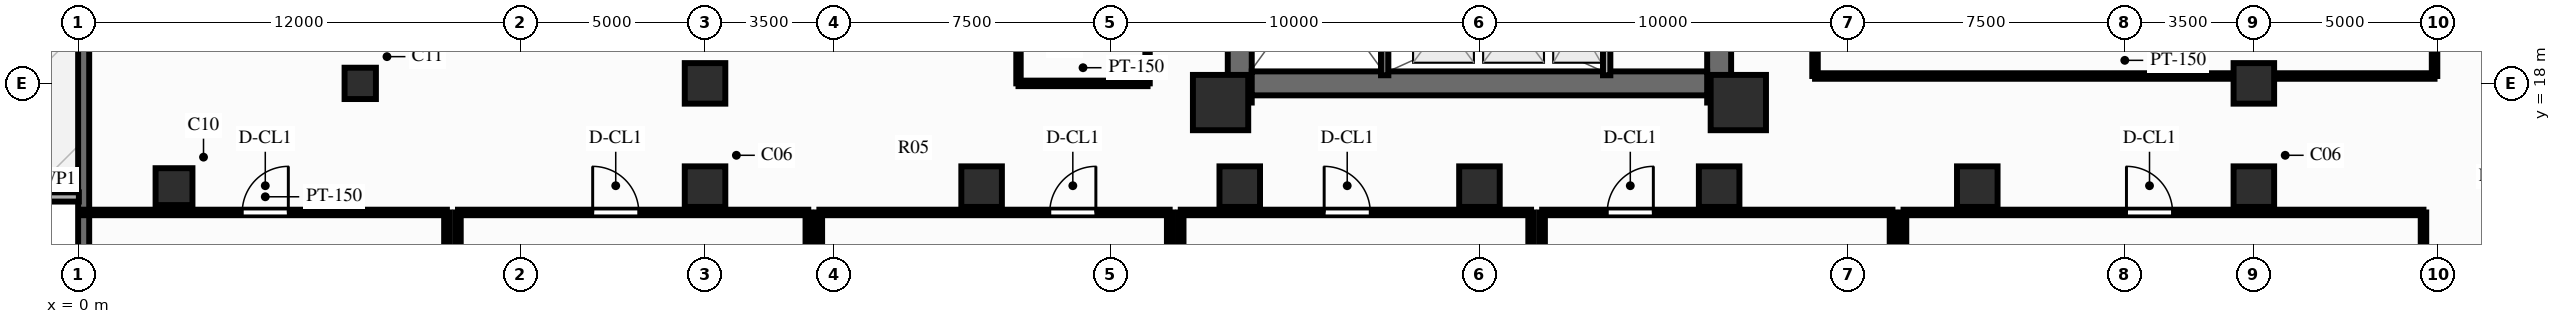
"""IFC4 building model, lengths in metres.
Left out: names, types, materials, properties, quantities, classifications, styles, units other than length and angle.
Written with IfcOpenShell. Run it as: python <this file> out.ifc"""

import sys

from ifc_helpers import new_model, si_unit, direction, frame, frame_2d, origin, origin_2d, place, context, subcontext, project, spatial, rectangle, circle, extrude, source, transform, mapped, element, fill, save


model = new_model("IFC4")
c1 = context("Model", 3, precision=1e-05, world=origin(), true_north=direction((0.0, 1.0)))
c2 = subcontext(c1, "Body", "Model", "MODEL_VIEW")
j1 = project(units=[si_unit("LENGTHUNIT", "METRE"), si_unit("PLANEANGLEUNIT", "RADIAN")], contexts=[c1])
p1 = place(None, origin())
s1 = spatial("IfcSite", under=j1, at=p1, CompositionType="ELEMENT")
p2 = place(p1, origin())
s2 = spatial("IfcBuilding", under=s1, at=p2, CompositionType="ELEMENT")
p3 = place(p2, frame((0.0, 0.0, 4.2)))
s3 = spatial("IfcBuildingStorey", under=s2, at=p3, CompositionType="ELEMENT", Elevation=4.2)
p4 = place(p3, frame((31.5, 17.48, 0.0), z_axis=(0.0, 0.0, 1.0), x_axis=(0.0, 1.0, 0.0)))
e1 = element("IfcWall", 1, at=p4, inside=s3, PredefinedType="SHEAR", context=c2, shape_type="SweptSolid", body=[
    extrude(rectangle(XDim=19.04, YDim=0.65, at=frame_2d((9.52, 0.0))), origin(), (0.0, 0.0, 1.0), 3.6),
])
p5 = place(p4, frame((6.32, 0.0, 0.0)))
e2 = element("IfcOpeningElement", 2, at=p5, cuts=e1, PredefinedType="OPENING", context=c2, shape_type="SweptSolid", body=[
    extrude(rectangle(XDim=1.1, YDim=2.15, at=frame_2d((0.55, 1.075))), frame((0.0, 0.337, 0.0), z_axis=(0.0, -1.0, 0.0), x_axis=(1.0, 0.0, 0.0)), (0.0, 0.0, 1.0), 0.674),
])
p6 = place(p3, frame((44.5, 17.48, 0.0), z_axis=(0.0, 0.0, 1.0), x_axis=(0.0, 1.0, 0.0)))
e3 = element("IfcWall", 3, at=p6, inside=s3, PredefinedType="SHEAR", context=c2, shape_type="SweptSolid", body=[
    extrude(rectangle(XDim=19.04, YDim=0.65, at=frame_2d((9.52, 0.0))), origin(), (0.0, 0.0, 1.0), 3.6),
])
p7 = place(p6, frame((12.67, 0.0, 0.0), z_axis=(0.0, 0.0, 1.0), x_axis=(-1.0, 0.0, 0.0)))
e4 = element("IfcOpeningElement", 4, at=p7, cuts=e3, PredefinedType="OPENING", context=c2, shape_type="SweptSolid", body=[
    extrude(rectangle(XDim=1.1, YDim=2.15, at=frame_2d((0.55, 1.075))), frame((0.0, 0.337, 0.0), z_axis=(0.0, -1.0, 0.0), x_axis=(1.0, 0.0, 0.0)), (0.0, 0.0, 1.0), 0.674),
])
p8 = place(p3, frame((31.825, 18.0, 0.0), z_axis=(0.0, 0.0, 1.0), x_axis=(1.0, 0.0, 0.0)))
e5 = element("IfcWall", 5, at=p8, inside=s3, PredefinedType="SHEAR", context=c2, shape_type="SweptSolid", body=[
    extrude(rectangle(XDim=12.35, YDim=0.65, at=frame_2d((6.175, 0.0))), origin(), (0.0, 0.0, 1.0), 3.6),
])
m1 = source(origin(), c2, "Body", "SweptSolid", [
    extrude(rectangle(XDim=1.5, YDim=1.5, at=origin_2d()), origin(), (0.0, 0.0, 1.0), 3.6),
])
for number, where, z_axis, x_axis in (
    (6, (30.98, 17.48, 0.0), (0.0, 0.0, 1.0), (1.0, 0.0, 0.0)),
    (7, (45.02, 17.48, 0.0), (0.0, 0.0, 1.0), (1.0, 0.0, 0.0)),
):
    element("IfcColumn", number, at=place(p3, frame(where, z_axis=z_axis, x_axis=x_axis)), inside=s3, PredefinedType="COLUMN", context=c2, shape_type="MappedRepresentation", body=[
        mapped(m1, transform((0.0, 0.0, 0.0), scale=1.0)),
    ])
m2 = source(origin(), c2, "Body", "SweptSolid", [
    extrude(circle(Radius=0.5, at=origin_2d()), origin(), (0.0, 0.0, 1.0), 3.6),
])
p9 = place(p3, frame((2.6, 15.2, 0.0), z_axis=(0.0, 0.0, 1.0), x_axis=(1.0, 0.0, 0.0)))
e8 = element("IfcColumn", 8, at=p9, inside=s3, PredefinedType="COLUMN", context=c2, shape_type="MappedRepresentation", body=[
    mapped(m2, transform((0.0, 0.0, 0.0), scale=1.0)),
])
m3 = source(origin(), c2, "Body", "SweptSolid", [
    extrude(circle(Radius=0.425, at=origin_2d()), origin(), (0.0, 0.0, 1.0), 3.6),
])
p10 = place(p3, frame((7.65, 18.0, 0.0), z_axis=(0.0, 0.0, 1.0), x_axis=(1.0, 0.0, 0.0)))
e9 = element("IfcColumn", 9, at=p10, inside=s3, PredefinedType="COLUMN", context=c2, shape_type="MappedRepresentation", body=[
    mapped(m3, transform((0.0, 0.0, 0.0), scale=1.0)),
])
m4 = source(origin(), c2, "Body", "SweptSolid", [
    extrude(rectangle(XDim=1.1, YDim=1.1, at=origin_2d()), origin(), (0.0, 0.0, 1.0), 3.6),
])
for number, where, z_axis, x_axis in (
    (10, (17.0, 15.2, 0.0), (0.0, 0.0, 1.0), (1.0, 0.0, 0.0)),
    (11, (59.0, 15.2, 0.0), (0.0, 0.0, 1.0), (1.0, 0.0, 0.0)),
    (12, (17.0, 18.0, 0.0), (0.0, 0.0, 1.0), (1.0, 0.0, 0.0)),
    (13, (59.0, 18.0, 0.0), (0.0, 0.0, 1.0), (1.0, 0.0, 0.0)),
    (14, (24.5, 15.2, 0.0), (0.0, 0.0, 1.0), (1.0, 0.0, 0.0)),
    (15, (31.5, 15.2, 0.0), (0.0, 0.0, 1.0), (1.0, 0.0, 0.0)),
    (16, (38.0, 15.2, 0.0), (0.0, 0.0, 1.0), (1.0, 0.0, 0.0)),
    (17, (44.5, 15.2, 0.0), (0.0, 0.0, 1.0), (1.0, 0.0, 0.0)),
    (18, (51.5, 15.2, 0.0), (0.0, 0.0, 1.0), (1.0, 0.0, 0.0)),
):
    element("IfcColumn", number, at=place(p3, frame(where, z_axis=z_axis, x_axis=x_axis)), inside=s3, PredefinedType="COLUMN", context=c2, shape_type="MappedRepresentation", body=[
        mapped(m4, transform((0.0, 0.0, 0.0), scale=1.0)),
    ])
p11 = place(p3, frame((0.15, 0.0, 0.0), z_axis=(0.0, 0.0, 1.0), x_axis=(0.0, 1.0, 0.0)))
e19 = element("IfcWall", 19, at=p11, inside=s3, PredefinedType="SOLIDWALL", context=c2, shape_type="SweptSolid", body=[
    extrude(rectangle(XDim=54.0, YDim=0.3, at=frame_2d((27.0, 0.0))), origin(), (0.0, 0.0, 1.0), 2.88),
])
p12 = place(p11, frame((6.405, 0.0, 0.85)))
e20 = element("IfcOpeningElement", 20, at=p12, cuts=e19, PredefinedType="OPENING", context=c2, shape_type="SweptSolid", body=[
    extrude(rectangle(XDim=1.8, YDim=1.65, at=frame_2d((0.9, 0.825))), frame((0.0, 0.162, 0.0), z_axis=(0.0, -1.0, 0.0), x_axis=(1.0, 0.0, 0.0)), (0.0, 0.0, 1.0), 0.324),
])
p13 = place(p11, frame((26.045, 0.0, 0.85)))
e21 = element("IfcOpeningElement", 21, at=p13, cuts=e19, PredefinedType="OPENING", context=c2, shape_type="SweptSolid", body=[
    extrude(rectangle(XDim=1.8, YDim=1.65, at=frame_2d((0.9, 0.825))), frame((0.0, 0.162, 0.0), z_axis=(0.0, -1.0, 0.0), x_axis=(1.0, 0.0, 0.0)), (0.0, 0.0, 1.0), 0.324),
])
p14 = place(p3, frame((-3.5, 14.92, 0.0), z_axis=(0.0, 0.0, 1.0), x_axis=(1.0, 0.0, 0.0)))
e22 = element("IfcWall", 22, at=p14, inside=s3, PredefinedType="PARAPET", context=c2, shape_type="SweptSolid", body=[
    extrude(rectangle(XDim=3.52, YDim=0.25, at=frame_2d((1.76, 0.0))), origin(), (0.0, 0.0, 1.0), 0.75),
])
p15 = place(p3, frame((41.45, 18.22, 0.0), z_axis=(0.0, 0.0, 1.0), x_axis=(0.0, 1.0, 0.0)))
e23 = element("IfcWall", 23, at=p15, inside=s3, PredefinedType="PARTITIONING", context=c2, shape_type="SweptSolid", body=[
    extrude(rectangle(XDim=2.96, YDim=0.2, at=frame_2d((1.48, 0.0))), origin(), (0.0, 0.0, 1.0), 3.32),
])
p16 = place(p3, frame((35.43, 18.22, 0.0), z_axis=(0.0, 0.0, 1.0), x_axis=(0.0, 1.0, 0.0)))
e24 = element("IfcWall", 24, at=p16, inside=s3, PredefinedType="SOLIDWALL", context=c2, shape_type="SweptSolid", body=[
    extrude(rectangle(XDim=7.22, YDim=0.2, at=frame_2d((3.61, 0.0))), origin(), (0.0, 0.0, 1.0), 3.32),
])
p17 = place(p16, frame((6.68, 0.0, 0.0), z_axis=(0.0, 0.0, 1.0), x_axis=(-1.0, 0.0, 0.0)))
e25 = element("IfcOpeningElement", 25, at=p17, cuts=e24, PredefinedType="OPENING", context=c2, shape_type="SweptSolid", body=[
    extrude(rectangle(XDim=1.1, YDim=2.15, at=frame_2d((0.55, 1.075))), frame((0.0, 0.112, 0.0), z_axis=(0.0, -1.0, 0.0), x_axis=(1.0, 0.0, 0.0)), (0.0, 0.0, 1.0), 0.224),
])
p18 = place(p3, frame((25.5, 18.0, 0.0), z_axis=(0.0, 0.0, 1.0), x_axis=(0.0, 1.0, 0.0)))
e26 = element("IfcWall", 26, at=p18, inside=s3, PredefinedType="PARTITIONING", context=c2, shape_type="SweptSolid", body=[
    extrude(rectangle(XDim=18.0, YDim=0.12, at=frame_2d((9.0, 0.0))), origin(), (0.0, 0.0, 1.0), 3.32),
])
p19 = place(p3, frame((29.0, 18.0, 0.0), z_axis=(0.0, 0.0, 1.0), x_axis=(0.0, 1.0, 0.0)))
e27 = element("IfcWall", 27, at=p19, inside=s3, PredefinedType="PARTITIONING", context=c2, shape_type="SweptSolid", body=[
    extrude(rectangle(XDim=4.0, YDim=0.12, at=frame_2d((2.0, 0.0))), origin(), (0.0, 0.0, 1.0), 3.32),
])
p20 = place(p19, frame((1.55, 0.0, 0.0)))
e28 = element("IfcOpeningElement", 28, at=p20, cuts=e27, PredefinedType="OPENING", context=c2, shape_type="SweptSolid", body=[
    extrude(rectangle(XDim=0.9, YDim=2.1, at=frame_2d((0.45, 1.05))), frame((0.0, 0.072, 0.0), z_axis=(0.0, -1.0, 0.0), x_axis=(1.0, 0.0, 0.0)), (0.0, 0.0, 1.0), 0.144),
])
p21 = place(p3, frame((25.5, 18.0, 0.0), z_axis=(0.0, 0.0, 1.0), x_axis=(1.0, 0.0, 0.0)))
e29 = element("IfcWall", 29, at=p21, inside=s3, PredefinedType="PARTITIONING", context=c2, shape_type="SweptSolid", body=[
    extrude(rectangle(XDim=3.5, YDim=0.15, at=frame_2d((1.75, 0.0))), origin(), (0.0, 0.0, 1.0), 2.69),
])
p22 = place(p3, frame((0.15, 14.5, 0.0), z_axis=(0.0, 0.0, 1.0), x_axis=(1.0, 0.0, 0.0)))
e30 = element("IfcWall", 30, at=p22, inside=s3, PredefinedType="PARTITIONING", context=c2, shape_type="SweptSolid", body=[
    extrude(rectangle(XDim=9.85, YDim=0.15, at=frame_2d((4.925, 0.0))), origin(), (0.0, 0.0, 1.0), 3.32),
])
p23 = place(p22, frame((4.3, 0.0, 0.0)))
e31 = element("IfcOpeningElement", 31, at=p23, cuts=e30, PredefinedType="OPENING", context=c2, shape_type="SweptSolid", body=[
    extrude(rectangle(XDim=1.25, YDim=2.15, at=frame_2d((0.625, 1.075))), frame((0.0, 0.087, 0.0), z_axis=(0.0, -1.0, 0.0), x_axis=(1.0, 0.0, 0.0)), (0.0, 0.0, 1.0), 0.174),
])
p24 = place(p3, frame((10.0, 0.1, 0.0), z_axis=(0.0, 0.0, 1.0), x_axis=(0.0, 1.0, 0.0)))
e32 = element("IfcWall", 32, at=p24, inside=s3, PredefinedType="PARTITIONING", context=c2, shape_type="SweptSolid", body=[
    extrude(rectangle(XDim=14.4, YDim=0.15, at=frame_2d((7.2, 0.0))), origin(), (0.0, 0.0, 1.0), 3.32),
])
p25 = place(p3, frame((10.3, 14.5, 0.0), z_axis=(0.0, 0.0, 1.0), x_axis=(1.0, 0.0, 0.0)))
e33 = element("IfcWall", 33, at=p25, inside=s3, PredefinedType="PARTITIONING", context=c2, shape_type="SweptSolid", body=[
    extrude(rectangle(XDim=9.5, YDim=0.15, at=frame_2d((4.75, 0.0))), origin(), (0.0, 0.0, 1.0), 3.32),
])
p26 = place(p25, frame((3.653, 0.0, 0.0)))
e34 = element("IfcOpeningElement", 34, at=p26, cuts=e33, PredefinedType="OPENING", context=c2, shape_type="SweptSolid", body=[
    extrude(rectangle(XDim=1.25, YDim=2.15, at=frame_2d((0.625, 1.075))), frame((0.0, 0.087, 0.0), z_axis=(0.0, -1.0, 0.0), x_axis=(1.0, 0.0, 0.0)), (0.0, 0.0, 1.0), 0.174),
])
for number, where, z_axis, x_axis in (
    (35, (10.3, 0.1, 0.0), (0.0, 0.0, 1.0), (0.0, 1.0, 0.0)),
    (36, (19.8, 0.1, 0.0), (0.0, 0.0, 1.0), (0.0, 1.0, 0.0)),
):
    element("IfcWall", number, at=place(p3, frame(where, z_axis=z_axis, x_axis=x_axis)), inside=s3, PredefinedType="PARTITIONING", context=c2, shape_type="SweptSolid", body=[
        extrude(rectangle(XDim=14.4, YDim=0.15, at=frame_2d((7.2, 0.0))), origin(), (0.0, 0.0, 1.0), 3.32),
    ])
p27 = place(p3, frame((20.1, 14.5, 0.0), z_axis=(0.0, 0.0, 1.0), x_axis=(1.0, 0.0, 0.0)))
e37 = element("IfcWall", 37, at=p27, inside=s3, PredefinedType="PARTITIONING", context=c2, shape_type="SweptSolid", body=[
    extrude(rectangle(XDim=9.5, YDim=0.15, at=frame_2d((4.75, 0.0))), origin(), (0.0, 0.0, 1.0), 3.32),
])
p28 = place(p27, frame((6.248, 0.0, 0.0)))
e38 = element("IfcOpeningElement", 38, at=p28, cuts=e37, PredefinedType="OPENING", context=c2, shape_type="SweptSolid", body=[
    extrude(rectangle(XDim=1.25, YDim=2.15, at=frame_2d((0.625, 1.075))), frame((0.0, 0.087, 0.0), z_axis=(0.0, -1.0, 0.0), x_axis=(1.0, 0.0, 0.0)), (0.0, 0.0, 1.0), 0.174),
])
for number, where, z_axis, x_axis in (
    (39, (20.1, 0.1, 0.0), (0.0, 0.0, 1.0), (0.0, 1.0, 0.0)),
    (40, (29.6, 0.1, 0.0), (0.0, 0.0, 1.0), (0.0, 1.0, 0.0)),
):
    element("IfcWall", number, at=place(p3, frame(where, z_axis=z_axis, x_axis=x_axis)), inside=s3, PredefinedType="PARTITIONING", context=c2, shape_type="SweptSolid", body=[
        extrude(rectangle(XDim=14.4, YDim=0.15, at=frame_2d((7.2, 0.0))), origin(), (0.0, 0.0, 1.0), 3.32),
    ])
p29 = place(p3, frame((29.9, 14.5, 0.0), z_axis=(0.0, 0.0, 1.0), x_axis=(1.0, 0.0, 0.0)))
e41 = element("IfcWall", 41, at=p29, inside=s3, PredefinedType="PARTITIONING", context=c2, shape_type="SweptSolid", body=[
    extrude(rectangle(XDim=9.5, YDim=0.15, at=frame_2d((4.75, 0.0))), origin(), (0.0, 0.0, 1.0), 3.32),
])
p30 = place(p29, frame((3.889, 0.0, 0.0)))
e42 = element("IfcOpeningElement", 42, at=p30, cuts=e41, PredefinedType="OPENING", context=c2, shape_type="SweptSolid", body=[
    extrude(rectangle(XDim=1.25, YDim=2.15, at=frame_2d((0.625, 1.075))), frame((0.0, 0.087, 0.0), z_axis=(0.0, -1.0, 0.0), x_axis=(1.0, 0.0, 0.0)), (0.0, 0.0, 1.0), 0.174),
])
for number, where, z_axis, x_axis in (
    (43, (29.9, 0.1, 0.0), (0.0, 0.0, 1.0), (0.0, 1.0, 0.0)),
    (44, (39.4, 0.1, 0.0), (0.0, 0.0, 1.0), (0.0, 1.0, 0.0)),
):
    element("IfcWall", number, at=place(p3, frame(where, z_axis=z_axis, x_axis=x_axis)), inside=s3, PredefinedType="PARTITIONING", context=c2, shape_type="SweptSolid", body=[
        extrude(rectangle(XDim=14.4, YDim=0.15, at=frame_2d((7.2, 0.0))), origin(), (0.0, 0.0, 1.0), 3.32),
    ])
p31 = place(p3, frame((39.7, 14.5, 0.0), z_axis=(0.0, 0.0, 1.0), x_axis=(1.0, 0.0, 0.0)))
e45 = element("IfcWall", 45, at=p31, inside=s3, PredefinedType="PARTITIONING", context=c2, shape_type="SweptSolid", body=[
    extrude(rectangle(XDim=9.5, YDim=0.15, at=frame_2d((4.75, 0.0))), origin(), (0.0, 0.0, 1.0), 3.32),
])
p32 = place(p31, frame((1.766, 0.0, 0.0)))
e46 = element("IfcOpeningElement", 46, at=p32, cuts=e45, PredefinedType="OPENING", context=c2, shape_type="SweptSolid", body=[
    extrude(rectangle(XDim=1.25, YDim=2.15, at=frame_2d((0.625, 1.075))), frame((0.0, 0.087, 0.0), z_axis=(0.0, -1.0, 0.0), x_axis=(1.0, 0.0, 0.0)), (0.0, 0.0, 1.0), 0.174),
])
for number, where, z_axis, x_axis in (
    (47, (39.7, 0.1, 0.0), (0.0, 0.0, 1.0), (0.0, 1.0, 0.0)),
    (48, (49.2, 0.1, 0.0), (0.0, 0.0, 1.0), (0.0, 1.0, 0.0)),
):
    element("IfcWall", number, at=place(p3, frame(where, z_axis=z_axis, x_axis=x_axis)), inside=s3, PredefinedType="PARTITIONING", context=c2, shape_type="SweptSolid", body=[
        extrude(rectangle(XDim=14.4, YDim=0.15, at=frame_2d((7.2, 0.0))), origin(), (0.0, 0.0, 1.0), 3.32),
    ])
p33 = place(p3, frame((49.5, 14.5, 0.0), z_axis=(0.0, 0.0, 1.0), x_axis=(1.0, 0.0, 0.0)))
e49 = element("IfcWall", 49, at=p33, inside=s3, PredefinedType="PARTITIONING", context=c2, shape_type="SweptSolid", body=[
    extrude(rectangle(XDim=14.1, YDim=0.15, at=frame_2d((7.05, 0.0))), origin(), (0.0, 0.0, 1.0), 3.32),
])
p34 = place(p33, frame((6.045, 0.0, 0.0)))
e50 = element("IfcOpeningElement", 50, at=p34, cuts=e49, PredefinedType="OPENING", context=c2, shape_type="SweptSolid", body=[
    extrude(rectangle(XDim=1.25, YDim=2.15, at=frame_2d((0.625, 1.075))), frame((0.0, 0.087, 0.0), z_axis=(0.0, -1.0, 0.0), x_axis=(1.0, 0.0, 0.0)), (0.0, 0.0, 1.0), 0.174),
])
for number, where, z_axis, x_axis in (
    (51, (49.5, 0.1, 0.0), (0.0, 0.0, 1.0), (0.0, 1.0, 0.0)),
    (52, (63.6, 0.1, 0.0), (0.0, 0.0, 1.0), (0.0, 1.0, 0.0)),
):
    element("IfcWall", number, at=place(p3, frame(where, z_axis=z_axis, x_axis=x_axis)), inside=s3, PredefinedType="PARTITIONING", context=c2, shape_type="SweptSolid", body=[
        extrude(rectangle(XDim=14.4, YDim=0.15, at=frame_2d((7.2, 0.0))), origin(), (0.0, 0.0, 1.0), 3.32),
    ])
p35 = place(p3, frame((47.1, 18.2, 0.0), z_axis=(0.0, 0.0, 1.0), x_axis=(1.0, 0.0, 0.0)))
e53 = element("IfcWall", 53, at=p35, inside=s3, PredefinedType="PARTITIONING", context=c2, shape_type="SweptSolid", body=[
    extrude(rectangle(XDim=16.8, YDim=0.15, at=frame_2d((8.4, 0.0))), origin(), (0.0, 0.0, 1.0), 3.32),
])
p36 = place(p3, frame((47.1, 18.2, 0.0), z_axis=(0.0, 0.0, 1.0), x_axis=(0.0, 1.0, 0.0)))
e54 = element("IfcWall", 54, at=p36, inside=s3, PredefinedType="PARTITIONING", context=c2, shape_type="SweptSolid", body=[
    extrude(rectangle(XDim=7.8, YDim=0.15, at=frame_2d((3.9, 0.0))), origin(), (0.0, 0.0, 1.0), 3.32),
])
p37 = place(p3, frame((63.9, 18.2, 0.0), z_axis=(0.0, 0.0, 1.0), x_axis=(0.0, 1.0, 0.0)))
e55 = element("IfcWall", 55, at=p37, inside=s3, PredefinedType="PARTITIONING", context=c2, shape_type="SweptSolid", body=[
    extrude(rectangle(XDim=7.8, YDim=0.15, at=frame_2d((3.9, 0.0))), origin(), (0.0, 0.0, 1.0), 3.32),
])
p38 = place(p37, frame((3.092, 0.0, 0.0)))
e56 = element("IfcOpeningElement", 56, at=p38, cuts=e55, PredefinedType="OPENING", context=c2, shape_type="SweptSolid", body=[
    extrude(rectangle(XDim=1.25, YDim=2.15, at=frame_2d((0.625, 1.075))), frame((0.0, 0.087, 0.0), z_axis=(0.0, -1.0, 0.0), x_axis=(1.0, 0.0, 0.0)), (0.0, 0.0, 1.0), 0.174),
])
m5 = source(origin(), c2, "Body", "SweptSolid", [
    extrude(rectangle(XDim=1.25, YDim=2.15, at=frame_2d((0.625, 1.075))), frame((0.0, 0.025, 0.0), z_axis=(0.0, -1.0, 0.0), x_axis=(1.0, 0.0, 0.0)), (0.0, 0.0, 1.0), 0.05),
])
p39 = place(p23, origin())
e57 = element("IfcDoor", 57, at=p39, inside=s3, OperationType="SINGLE_SWING_RIGHT", PredefinedType="DOOR", context=c2, shape_type="MappedRepresentation", body=[
    mapped(m5, transform((0.0, 0.0, 0.0), scale=1.0)),
])
fill(e31, e57)
p40 = place(p26, origin())
e58 = element("IfcDoor", 58, at=p40, inside=s3, OperationType="SINGLE_SWING_LEFT", PredefinedType="DOOR", context=c2, shape_type="MappedRepresentation", body=[
    mapped(m5, transform((0.0, 0.0, 0.0), scale=1.0)),
])
fill(e34, e58)
p41 = place(p28, origin())
e59 = element("IfcDoor", 59, at=p41, inside=s3, OperationType="SINGLE_SWING_RIGHT", PredefinedType="DOOR", context=c2, shape_type="MappedRepresentation", body=[
    mapped(m5, transform((0.0, 0.0, 0.0), scale=1.0)),
])
fill(e38, e59)
p42 = place(p30, origin())
e60 = element("IfcDoor", 60, at=p42, inside=s3, OperationType="SINGLE_SWING_LEFT", PredefinedType="DOOR", context=c2, shape_type="MappedRepresentation", body=[
    mapped(m5, transform((0.0, 0.0, 0.0), scale=1.0)),
])
fill(e42, e60)
p43 = place(p32, origin())
e61 = element("IfcDoor", 61, at=p43, inside=s3, OperationType="SINGLE_SWING_RIGHT", PredefinedType="DOOR", context=c2, shape_type="MappedRepresentation", body=[
    mapped(m5, transform((0.0, 0.0, 0.0), scale=1.0)),
])
fill(e46, e61)
p44 = place(p34, origin())
e62 = element("IfcDoor", 62, at=p44, inside=s3, OperationType="SINGLE_SWING_LEFT", PredefinedType="DOOR", context=c2, shape_type="MappedRepresentation", body=[
    mapped(m5, transform((0.0, 0.0, 0.0), scale=1.0)),
])
fill(e50, e62)
save(model, sys.argv[1])
